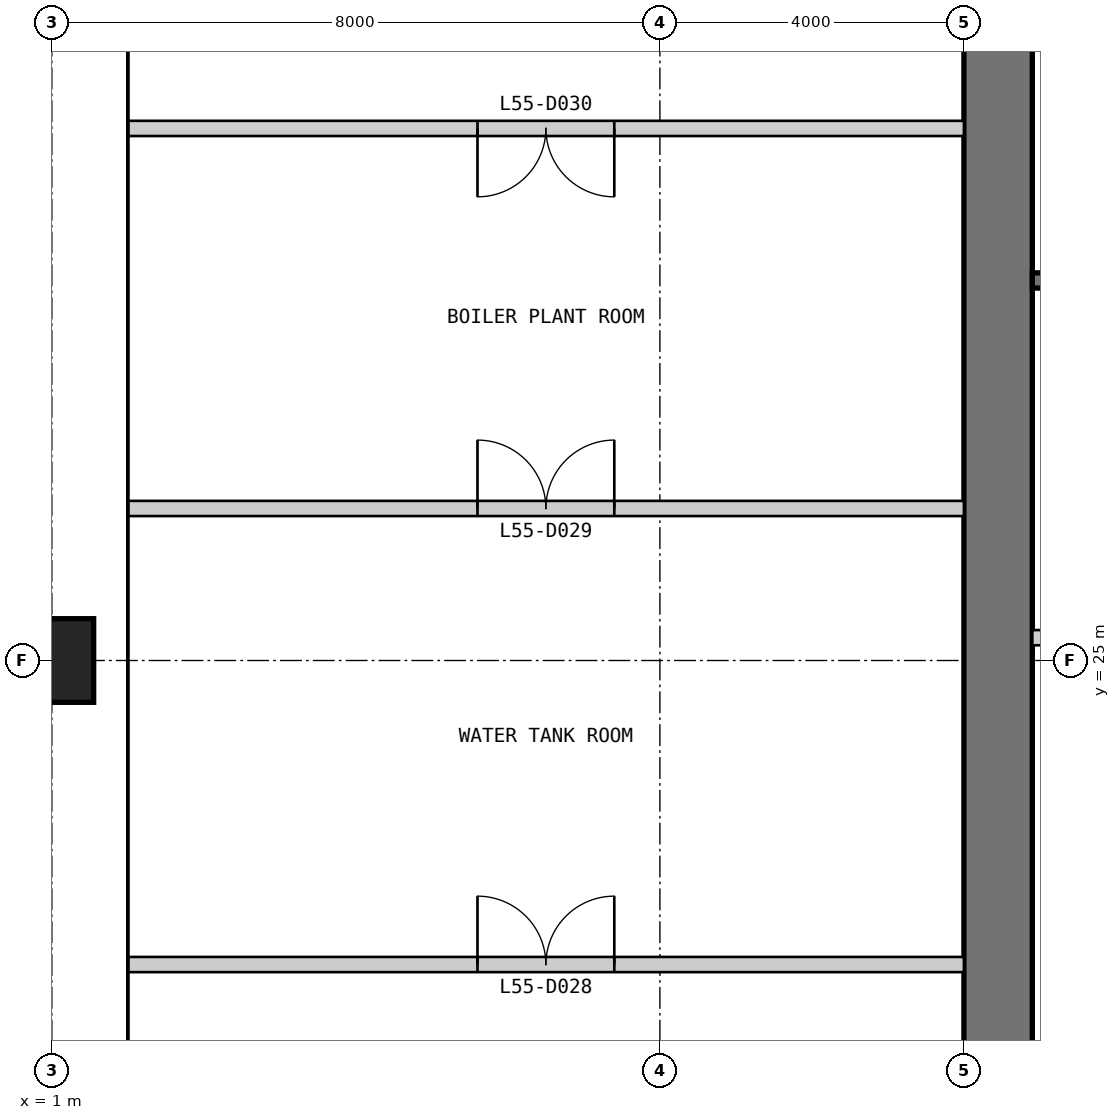
"""IFC4 building model, lengths in metres.
Left out: names, types, materials, properties, quantities, classifications, styles, units other than length and angle.
Written with IfcOpenShell. Run it as: python <this file> out.ifc"""

import sys

from ifc_helpers import new_model, si_unit, direction, frame, frame_2d, origin, origin_2d, place, context, subcontext, project, spatial, polyline, rectangle, outline, extrude, element, fill, save


model = new_model("IFC4")
c1 = context("Model", 3, precision=1e-05, world=origin(), true_north=direction((0.0, 1.0)))
c2 = subcontext(c1, "Body", "Model", "MODEL_VIEW")
j1 = project(units=[si_unit("LENGTHUNIT", "METRE"), si_unit("PLANEANGLEUNIT", "RADIAN")], contexts=[c1])
p1 = place(None, origin())
s1 = spatial("IfcSite", under=j1, at=p1, CompositionType="ELEMENT")
p2 = place(p1, origin())
s2 = spatial("IfcBuilding", under=s1, at=p2, CompositionType="ELEMENT")
p3 = place(p2, frame((0.0, 0.0, 233.8)))
s3 = spatial("IfcBuildingStorey", under=s2, at=p3, CompositionType="ELEMENT", Elevation=233.8)
p4 = place(p3, frame((1.0, 25.0, 0.0), z_axis=(0.0, 0.0, 1.0), x_axis=(1.0, 0.0, 0.0)))
e1 = element("IfcColumn", 1, at=p4, inside=s3, PredefinedType="COLUMN", context=c2, shape_type="SweptSolid", body=[
    extrude(rectangle(XDim=1.1, YDim=1.1, at=origin_2d()), origin(), (0.0, 0.0, 1.0), 6.0),
])
p5 = place(p3, frame((13.45, 36.1, 0.0), z_axis=(0.0, 0.0, 1.0), x_axis=(0.0, -1.0, 0.0)))
e2 = element("IfcWall", 2, at=p5, inside=s3, PredefinedType="SHEAR", context=c2, shape_type="SweptSolid", body=[
    extrude(outline(polyline([(-0.9, -0.45), (23.1, -0.45), (22.2, 0.45), (0.0, 0.45), (-0.9, -0.45)])), origin(), (0.0, 0.0, 1.0), 6.0),
])
p6 = place(p5, frame((20.2, 0.0, 0.0)))
e3 = element("IfcOpeningElement", 3, at=p6, cuts=e2, PredefinedType="OPENING", context=c2, shape_type="SweptSolid", body=[
    extrude(rectangle(XDim=1.0, YDim=2.2, at=frame_2d((0.5, 1.1))), frame((0.0, 0.46, 0.0), z_axis=(0.0, -1.0, 0.0), x_axis=(1.0, 0.0, 0.0)), (0.0, 0.0, 1.0), 0.92),
])
p7 = place(p5, frame((17.25, 0.0, 0.0)))
e4 = element("IfcOpeningElement", 4, at=p7, cuts=e2, PredefinedType="OPENING", context=c2, shape_type="SweptSolid", body=[
    extrude(rectangle(XDim=0.9, YDim=2.2, at=frame_2d((0.45, 1.1))), frame((0.0, 0.46, 0.0), z_axis=(0.0, -1.0, 0.0), x_axis=(1.0, 0.0, 0.0)), (0.0, 0.0, 1.0), 0.92),
])
p8 = place(p3, frame((13.9, 25.3, 0.0), z_axis=(0.0, 0.0, 1.0), x_axis=(1.0, 0.0, 0.0)))
e5 = element("IfcWall", 5, at=p8, inside=s3, PredefinedType="PARTITIONING", context=c2, shape_type="SweptSolid", body=[
    extrude(rectangle(XDim=2.8, YDim=0.2, at=frame_2d((1.4, 0.0))), origin(), (0.0, 0.0, 1.0), 5.8),
])
p9 = place(p3, frame((29.7, 30.0, 0.0), z_axis=(0.0, 0.0, 1.0), x_axis=(-1.0, 0.0, 0.0)))
e6 = element("IfcWall", 6, at=p9, inside=s3, PredefinedType="SOLIDWALL", context=c2, shape_type="SweptSolid", body=[
    extrude(rectangle(XDim=15.8, YDim=0.2, at=frame_2d((7.9, 0.0))), origin(), (0.0, 0.0, 1.0), 5.8),
])
p10 = place(p3, frame((2.0, 21.0, 0.0), z_axis=(0.0, 0.0, 1.0), x_axis=(1.0, 0.0, 0.0)))
e7 = element("IfcWall", 7, at=p10, inside=s3, PredefinedType="PARTITIONING", context=c2, shape_type="SweptSolid", body=[
    extrude(rectangle(XDim=11.0, YDim=0.2, at=frame_2d((5.5, 0.0))), origin(), (0.0, 0.0, 1.0), 5.8),
])
p11 = place(p10, frame((4.6, 0.0, 0.0)))
e8 = element("IfcOpeningElement", 8, at=p11, cuts=e7, PredefinedType="OPENING", context=c2, shape_type="SweptSolid", body=[
    extrude(rectangle(XDim=1.8, YDim=2.4, at=frame_2d((0.9, 1.2))), frame((0.0, 0.11, 0.0), z_axis=(0.0, -1.0, 0.0), x_axis=(1.0, 0.0, 0.0)), (0.0, 0.0, 1.0), 0.22),
])
p12 = place(p3, frame((2.0, 27.0, 0.0), z_axis=(0.0, 0.0, 1.0), x_axis=(1.0, 0.0, 0.0)))
e9 = element("IfcWall", 9, at=p12, inside=s3, PredefinedType="PARTITIONING", context=c2, shape_type="SweptSolid", body=[
    extrude(rectangle(XDim=11.0, YDim=0.2, at=frame_2d((5.5, 0.0))), origin(), (0.0, 0.0, 1.0), 5.8),
])
p13 = place(p12, frame((4.6, 0.0, 0.0)))
e10 = element("IfcOpeningElement", 10, at=p13, cuts=e9, PredefinedType="OPENING", context=c2, shape_type="SweptSolid", body=[
    extrude(rectangle(XDim=1.8, YDim=2.4, at=frame_2d((0.9, 1.2))), frame((0.0, 0.11, 0.0), z_axis=(0.0, -1.0, 0.0), x_axis=(1.0, 0.0, 0.0)), (0.0, 0.0, 1.0), 0.22),
])
p14 = place(p3, frame((2.0, 32.0, 0.0), z_axis=(0.0, 0.0, 1.0), x_axis=(1.0, 0.0, 0.0)))
e11 = element("IfcWall", 11, at=p14, inside=s3, PredefinedType="PARTITIONING", context=c2, shape_type="SweptSolid", body=[
    extrude(rectangle(XDim=11.0, YDim=0.2, at=frame_2d((5.5, 0.0))), origin(), (0.0, 0.0, 1.0), 5.8),
])
p15 = place(p14, frame((4.6, 0.0, 0.0)))
e12 = element("IfcOpeningElement", 12, at=p15, cuts=e11, PredefinedType="OPENING", context=c2, shape_type="SweptSolid", body=[
    extrude(rectangle(XDim=1.8, YDim=2.4, at=frame_2d((0.9, 1.2))), frame((0.0, 0.11, 0.0), z_axis=(0.0, -1.0, 0.0), x_axis=(1.0, 0.0, 0.0)), (0.0, 0.0, 1.0), 0.22),
])
p16 = place(p11, origin())
e13 = element("IfcDoor", 13, at=p16, inside=s3, OperationType="DOUBLE_DOOR_SINGLE_SWING", PredefinedType="DOOR", context=c2, shape_type="SweptSolid", body=[
    extrude(rectangle(XDim=1.8, YDim=2.4, at=frame_2d((0.9, 1.2))), frame((0.0, 0.025, 0.0), z_axis=(0.0, -1.0, 0.0), x_axis=(1.0, 0.0, 0.0)), (0.0, 0.0, 1.0), 0.05),
])
fill(e8, e13)
p17 = place(p13, origin())
e14 = element("IfcDoor", 14, at=p17, inside=s3, OperationType="DOUBLE_DOOR_SINGLE_SWING", PredefinedType="DOOR", context=c2, shape_type="SweptSolid", body=[
    extrude(rectangle(XDim=1.8, YDim=2.4, at=frame_2d((0.9, 1.2))), frame((0.0, 0.025, 0.0), z_axis=(0.0, -1.0, 0.0), x_axis=(1.0, 0.0, 0.0)), (0.0, 0.0, 1.0), 0.05),
])
fill(e10, e14)
p18 = place(p15, frame((1.8, 0.0, 0.0), z_axis=(0.0, 0.0, 1.0), x_axis=(-1.0, 0.0, 0.0)))
e15 = element("IfcDoor", 15, at=p18, inside=s3, OperationType="DOUBLE_DOOR_SINGLE_SWING", PredefinedType="DOOR", context=c2, shape_type="SweptSolid", body=[
    extrude(rectangle(XDim=1.8, YDim=2.4, at=frame_2d((0.9, 1.2))), frame((0.0, 0.025, 0.0), z_axis=(0.0, -1.0, 0.0), x_axis=(1.0, 0.0, 0.0)), (0.0, 0.0, 1.0), 0.05),
])
fill(e12, e15)
save(model, sys.argv[1])
